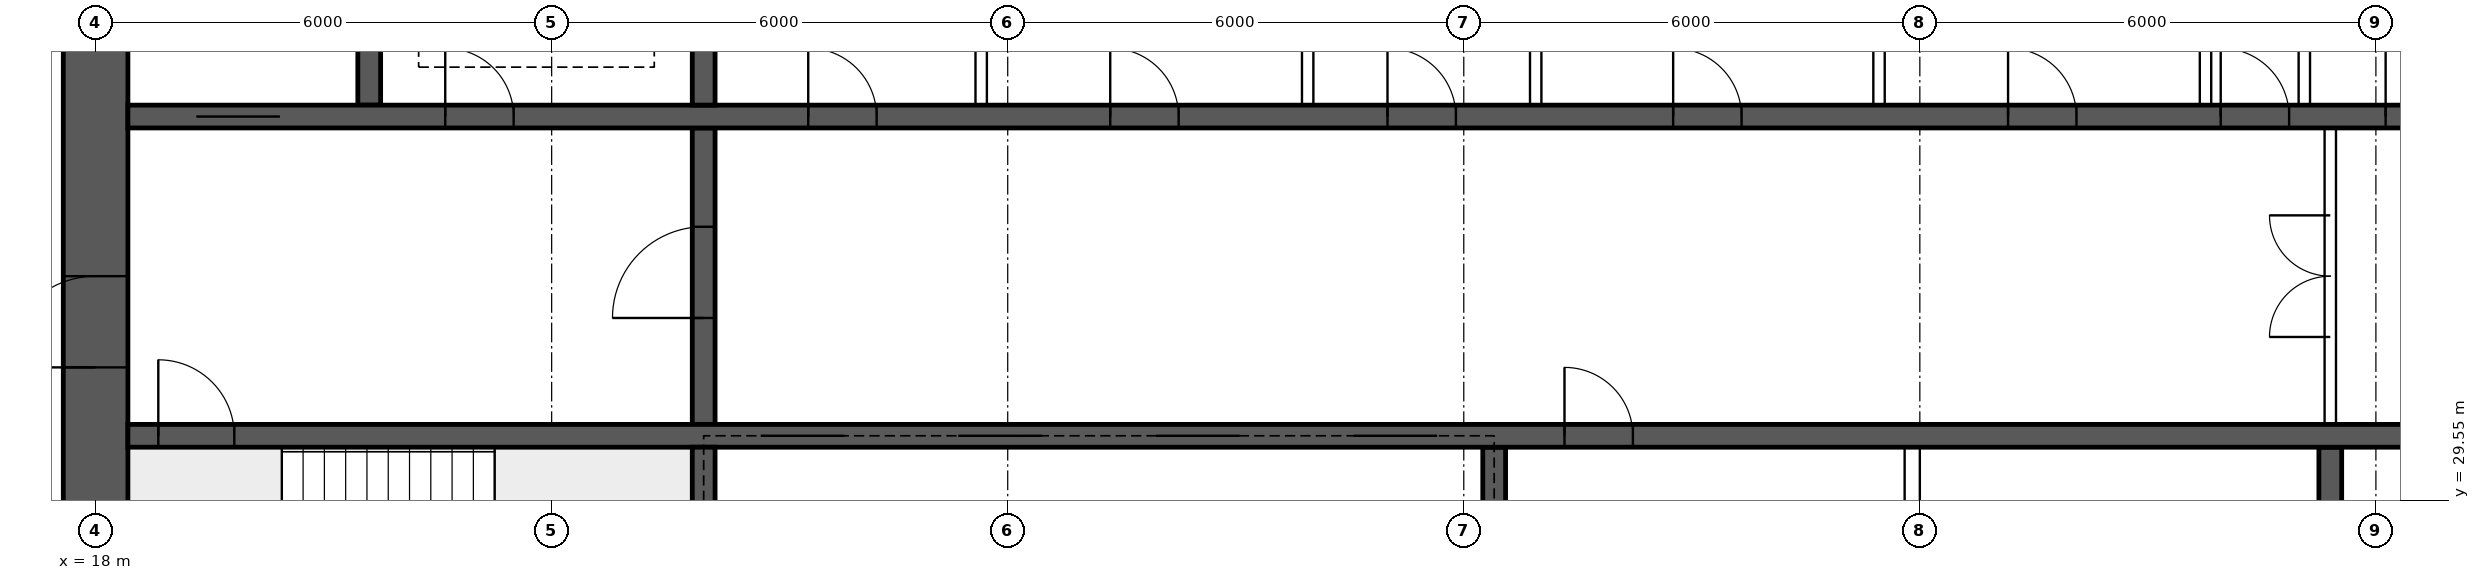
"""IFC4 building model, lengths in metres.
Left out: names, types, materials, properties, quantities, classifications, styles, units other than length and angle.
Written with IfcOpenShell. Run it as: python <this file> out.ifc"""

import sys

from ifc_helpers import new_model, si_unit, direction, frame, frame_2d, origin, place, context, subcontext, project, spatial, rectangle, extrude, element, fill, save


model = new_model("IFC4")
c1 = context("Model", 3, precision=1e-05, world=origin(), true_north=direction((0.0, 1.0)))
c2 = subcontext(c1, "Body", "Model", "MODEL_VIEW")
j1 = project(units=[si_unit("LENGTHUNIT", "METRE"), si_unit("PLANEANGLEUNIT", "RADIAN")], contexts=[c1])
p1 = place(None, origin())
s1 = spatial("IfcSite", under=j1, at=p1, CompositionType="ELEMENT")
p2 = place(p1, origin())
s2 = spatial("IfcBuilding", under=s1, at=p2, CompositionType="ELEMENT")
p3 = place(p2, frame((0.0, 0.0, 197.35)))
s3 = spatial("IfcBuildingStorey", under=s2, at=p3, CompositionType="ELEMENT", Elevation=197.35)
p4 = place(p3, frame((18.0, 26.225, 0.0), z_axis=(0.0, 0.0, 1.0), x_axis=(0.0, 1.0, 0.0)))
e1 = element("IfcWall", 1, at=p4, inside=s3, PredefinedType="SHEAR", context=c2, shape_type="SweptSolid", body=[
    extrude(rectangle(XDim=11.55, YDim=0.85, at=frame_2d((5.775, 0.0))), origin(), (0.0, 0.0, 1.0), 3.75),
])
p5 = place(p4, frame((5.075, 0.0, 0.0)))
e2 = element("IfcOpeningElement", 2, at=p5, cuts=e1, PredefinedType="OPENING", context=c2, shape_type="SweptSolid", body=[
    extrude(rectangle(XDim=1.2, YDim=2.1, at=frame_2d((0.6, 1.05))), frame((0.0, 0.435, 0.0), z_axis=(0.0, -1.0, 0.0), x_axis=(1.0, 0.0, 0.0)), (0.0, 0.0, 1.0), 0.87),
])
p6 = place(p3, frame((18.425, 30.4, 0.0), z_axis=(0.0, 0.0, 1.0), x_axis=(1.0, 0.0, 0.0)))
e3 = element("IfcWall", 3, at=p6, inside=s3, PredefinedType="SHEAR", context=c2, shape_type="SweptSolid", body=[
    extrude(rectangle(XDim=47.15, YDim=0.3, at=frame_2d((23.575, 0.0))), origin(), (0.0, 0.0, 1.0), 3.75),
])
p7 = place(p6, frame((0.4, 0.0, 0.0)))
e4 = element("IfcOpeningElement", 4, at=p7, cuts=e3, PredefinedType="OPENING", context=c2, shape_type="SweptSolid", body=[
    extrude(rectangle(XDim=1.0, YDim=2.1, at=frame_2d((0.5, 1.05))), frame((0.0, 0.16, 0.0), z_axis=(0.0, -1.0, 0.0), x_axis=(1.0, 0.0, 0.0)), (0.0, 0.0, 1.0), 0.32),
])
p8 = place(p6, frame((45.75, 0.0, 0.0)))
e5 = element("IfcOpeningElement", 5, at=p8, cuts=e3, PredefinedType="OPENING", context=c2, shape_type="SweptSolid", body=[
    extrude(rectangle(XDim=1.0, YDim=2.1, at=frame_2d((0.5, 1.05))), frame((0.0, 0.16, 0.0), z_axis=(0.0, -1.0, 0.0), x_axis=(1.0, 0.0, 0.0)), (0.0, 0.0, 1.0), 0.32),
])
p9 = place(p6, frame((8.325, 0.0, 0.0)))
e6 = element("IfcOpeningElement", 6, at=p9, cuts=e3, PredefinedType="OPENING", context=c2, shape_type="SweptSolid", body=[
    extrude(rectangle(XDim=1.1, YDim=2.1, at=frame_2d((0.55, 1.05))), frame((0.0, 0.16, 0.0), z_axis=(0.0, -1.0, 0.0), x_axis=(1.0, 0.0, 0.0)), (0.0, 0.0, 1.0), 0.32),
])
p10 = place(p6, frame((10.925, 0.0, 0.0)))
e7 = element("IfcOpeningElement", 7, at=p10, cuts=e3, PredefinedType="OPENING", context=c2, shape_type="SweptSolid", body=[
    extrude(rectangle(XDim=1.1, YDim=2.1, at=frame_2d((0.55, 1.05))), frame((0.0, 0.16, 0.0), z_axis=(0.0, -1.0, 0.0), x_axis=(1.0, 0.0, 0.0)), (0.0, 0.0, 1.0), 0.32),
])
p11 = place(p6, frame((13.525, 0.0, 0.0)))
e8 = element("IfcOpeningElement", 8, at=p11, cuts=e3, PredefinedType="OPENING", context=c2, shape_type="SweptSolid", body=[
    extrude(rectangle(XDim=1.1, YDim=2.1, at=frame_2d((0.55, 1.05))), frame((0.0, 0.16, 0.0), z_axis=(0.0, -1.0, 0.0), x_axis=(1.0, 0.0, 0.0)), (0.0, 0.0, 1.0), 0.32),
])
p12 = place(p6, frame((16.125, 0.0, 0.0)))
e9 = element("IfcOpeningElement", 9, at=p12, cuts=e3, PredefinedType="OPENING", context=c2, shape_type="SweptSolid", body=[
    extrude(rectangle(XDim=1.1, YDim=2.1, at=frame_2d((0.55, 1.05))), frame((0.0, 0.16, 0.0), z_axis=(0.0, -1.0, 0.0), x_axis=(1.0, 0.0, 0.0)), (0.0, 0.0, 1.0), 0.32),
])
p13 = place(p6, frame((18.9, 0.0, 0.0)))
e10 = element("IfcOpeningElement", 10, at=p13, cuts=e3, PredefinedType="OPENING", context=c2, shape_type="SweptSolid", body=[
    extrude(rectangle(XDim=0.9, YDim=2.1, at=frame_2d((0.45, 1.05))), frame((0.0, 0.16, 0.0), z_axis=(0.0, -1.0, 0.0), x_axis=(1.0, 0.0, 0.0)), (0.0, 0.0, 1.0), 0.32),
])
p14 = place(p6, frame((30.192, 0.0, 0.0)))
e11 = element("IfcOpeningElement", 11, at=p14, cuts=e3, PredefinedType="OPENING", context=c2, shape_type="SweptSolid", body=[
    extrude(rectangle(XDim=1.1, YDim=2.1, at=frame_2d((0.55, 1.05))), frame((0.0, 0.16, 0.0), z_axis=(0.0, -1.0, 0.0), x_axis=(1.0, 0.0, 0.0)), (0.0, 0.0, 1.0), 0.32),
])
p15 = place(p6, frame((33.725, 0.0, 0.0)))
e12 = element("IfcOpeningElement", 12, at=p15, cuts=e3, PredefinedType="OPENING", context=c2, shape_type="SweptSolid", body=[
    extrude(rectangle(XDim=1.1, YDim=2.1, at=frame_2d((0.55, 1.05))), frame((0.0, 0.16, 0.0), z_axis=(0.0, -1.0, 0.0), x_axis=(1.0, 0.0, 0.0)), (0.0, 0.0, 1.0), 0.32),
])
p16 = place(p6, frame((37.258, 0.0, 0.0)))
e13 = element("IfcOpeningElement", 13, at=p16, cuts=e3, PredefinedType="OPENING", context=c2, shape_type="SweptSolid", body=[
    extrude(rectangle(XDim=1.1, YDim=2.1, at=frame_2d((0.55, 1.05))), frame((0.0, 0.16, 0.0), z_axis=(0.0, -1.0, 0.0), x_axis=(1.0, 0.0, 0.0)), (0.0, 0.0, 1.0), 0.32),
])
p17 = place(p3, frame((18.425, 34.6, 0.0), z_axis=(0.0, 0.0, 1.0), x_axis=(1.0, 0.0, 0.0)))
e14 = element("IfcWall", 14, at=p17, inside=s3, PredefinedType="SHEAR", context=c2, shape_type="SweptSolid", body=[
    extrude(rectangle(XDim=47.15, YDim=0.3, at=frame_2d((23.575, 0.0))), origin(), (0.0, 0.0, 1.0), 3.75),
])
p18 = place(p17, frame((0.9, 0.0, 0.0)))
e15 = element("IfcOpeningElement", 15, at=p18, cuts=e14, PredefinedType="OPENING", context=c2, shape_type="SweptSolid", body=[
    extrude(rectangle(XDim=1.1, YDim=2.1, at=frame_2d((0.55, 1.05))), frame((0.0, 0.16, 0.0), z_axis=(0.0, -1.0, 0.0), x_axis=(1.0, 0.0, 0.0)), (0.0, 0.0, 1.0), 0.32),
])
p19 = place(p17, frame((45.15, 0.0, 0.0)))
e16 = element("IfcOpeningElement", 16, at=p19, cuts=e14, PredefinedType="OPENING", context=c2, shape_type="SweptSolid", body=[
    extrude(rectangle(XDim=1.1, YDim=2.1, at=frame_2d((0.55, 1.05))), frame((0.0, 0.16, 0.0), z_axis=(0.0, -1.0, 0.0), x_axis=(1.0, 0.0, 0.0)), (0.0, 0.0, 1.0), 0.32),
])
p20 = place(p17, frame((4.175, 0.0, 0.0)))
e17 = element("IfcOpeningElement", 17, at=p20, cuts=e14, PredefinedType="OPENING", context=c2, shape_type="SweptSolid", body=[
    extrude(rectangle(XDim=0.9, YDim=2.1, at=frame_2d((0.45, 1.05))), frame((0.0, 0.16, 0.0), z_axis=(0.0, -1.0, 0.0), x_axis=(1.0, 0.0, 0.0)), (0.0, 0.0, 1.0), 0.32),
])
p21 = place(p17, frame((42.075, 0.0, 0.0)))
e18 = element("IfcOpeningElement", 18, at=p21, cuts=e14, PredefinedType="OPENING", context=c2, shape_type="SweptSolid", body=[
    extrude(rectangle(XDim=0.9, YDim=2.1, at=frame_2d((0.45, 1.05))), frame((0.0, 0.16, 0.0), z_axis=(0.0, -1.0, 0.0), x_axis=(1.0, 0.0, 0.0)), (0.0, 0.0, 1.0), 0.32),
])
p22 = place(p17, frame((8.95, 0.0, 0.0)))
e19 = element("IfcOpeningElement", 19, at=p22, cuts=e14, PredefinedType="OPENING", context=c2, shape_type="SweptSolid", body=[
    extrude(rectangle(XDim=0.9, YDim=2.1, at=frame_2d((0.45, 1.05))), frame((0.0, 0.16, 0.0), z_axis=(0.0, -1.0, 0.0), x_axis=(1.0, 0.0, 0.0)), (0.0, 0.0, 1.0), 0.32),
])
p23 = place(p17, frame((12.924, 0.0, 0.0)))
e20 = element("IfcOpeningElement", 20, at=p23, cuts=e14, PredefinedType="OPENING", context=c2, shape_type="SweptSolid", body=[
    extrude(rectangle(XDim=0.9, YDim=2.1, at=frame_2d((0.45, 1.05))), frame((0.0, 0.16, 0.0), z_axis=(0.0, -1.0, 0.0), x_axis=(1.0, 0.0, 0.0)), (0.0, 0.0, 1.0), 0.32),
])
p24 = place(p17, frame((16.571, 0.0, 0.0)))
e21 = element("IfcOpeningElement", 21, at=p24, cuts=e14, PredefinedType="OPENING", context=c2, shape_type="SweptSolid", body=[
    extrude(rectangle(XDim=0.9, YDim=2.1, at=frame_2d((0.45, 1.05))), frame((0.0, 0.16, 0.0), z_axis=(0.0, -1.0, 0.0), x_axis=(1.0, 0.0, 0.0)), (0.0, 0.0, 1.0), 0.32),
])
p25 = place(p17, frame((20.33, 0.0, 0.0)))
e22 = element("IfcOpeningElement", 22, at=p25, cuts=e14, PredefinedType="OPENING", context=c2, shape_type="SweptSolid", body=[
    extrude(rectangle(XDim=0.9, YDim=2.1, at=frame_2d((0.45, 1.05))), frame((0.0, 0.16, 0.0), z_axis=(0.0, -1.0, 0.0), x_axis=(1.0, 0.0, 0.0)), (0.0, 0.0, 1.0), 0.32),
])
p26 = place(p17, frame((24.736, 0.0, 0.0)))
e23 = element("IfcOpeningElement", 23, at=p26, cuts=e14, PredefinedType="OPENING", context=c2, shape_type="SweptSolid", body=[
    extrude(rectangle(XDim=0.9, YDim=2.1, at=frame_2d((0.45, 1.05))), frame((0.0, 0.16, 0.0), z_axis=(0.0, -1.0, 0.0), x_axis=(1.0, 0.0, 0.0)), (0.0, 0.0, 1.0), 0.32),
])
p27 = place(p17, frame((27.533, 0.0, 0.0)))
e24 = element("IfcOpeningElement", 24, at=p27, cuts=e14, PredefinedType="OPENING", context=c2, shape_type="SweptSolid", body=[
    extrude(rectangle(XDim=0.9, YDim=2.1, at=frame_2d((0.45, 1.05))), frame((0.0, 0.16, 0.0), z_axis=(0.0, -1.0, 0.0), x_axis=(1.0, 0.0, 0.0)), (0.0, 0.0, 1.0), 0.32),
])
p28 = place(p17, frame((29.703, 0.0, 0.0)))
e25 = element("IfcOpeningElement", 25, at=p28, cuts=e14, PredefinedType="OPENING", context=c2, shape_type="SweptSolid", body=[
    extrude(rectangle(XDim=0.9, YDim=2.1, at=frame_2d((0.45, 1.05))), frame((0.0, 0.16, 0.0), z_axis=(0.0, -1.0, 0.0), x_axis=(1.0, 0.0, 0.0)), (0.0, 0.0, 1.0), 0.32),
])
p29 = place(p17, frame((33.502, 0.0, 0.0)))
e26 = element("IfcOpeningElement", 26, at=p29, cuts=e14, PredefinedType="OPENING", context=c2, shape_type="SweptSolid", body=[
    extrude(rectangle(XDim=0.9, YDim=2.1, at=frame_2d((0.45, 1.05))), frame((0.0, 0.16, 0.0), z_axis=(0.0, -1.0, 0.0), x_axis=(1.0, 0.0, 0.0)), (0.0, 0.0, 1.0), 0.32),
])
p30 = place(p17, frame((37.453, 0.0, 0.0)))
e27 = element("IfcOpeningElement", 27, at=p30, cuts=e14, PredefinedType="OPENING", context=c2, shape_type="SweptSolid", body=[
    extrude(rectangle(XDim=0.9, YDim=2.1, at=frame_2d((0.45, 1.05))), frame((0.0, 0.16, 0.0), z_axis=(0.0, -1.0, 0.0), x_axis=(1.0, 0.0, 0.0)), (0.0, 0.0, 1.0), 0.32),
])
p31 = place(p3, frame((26.0, 26.225, 0.0), z_axis=(0.0, 0.0, 1.0), x_axis=(0.0, 1.0, 0.0)))
e28 = element("IfcWall", 28, at=p31, inside=s3, PredefinedType="SHEAR", context=c2, shape_type="SweptSolid", body=[
    extrude(rectangle(XDim=4.025, YDim=0.3, at=frame_2d((2.012, 0.0))), origin(), (0.0, 0.0, 1.0), 3.75),
])
p32 = place(p3, frame((26.0, 30.55, 0.0), z_axis=(0.0, 0.0, 1.0), x_axis=(0.0, 1.0, 0.0)))
e29 = element("IfcWall", 29, at=p32, inside=s3, PredefinedType="SHEAR", context=c2, shape_type="SweptSolid", body=[
    extrude(rectangle(XDim=3.9, YDim=0.3, at=frame_2d((1.95, 0.0))), origin(), (0.0, 0.0, 1.0), 3.75),
])
p33 = place(p32, frame((1.4, 0.0, 0.0)))
e30 = element("IfcOpeningElement", 30, at=p33, cuts=e29, PredefinedType="OPENING", context=c2, shape_type="SweptSolid", body=[
    extrude(rectangle(XDim=1.2, YDim=2.1, at=frame_2d((0.6, 1.05))), frame((0.0, 0.16, 0.0), z_axis=(0.0, -1.0, 0.0), x_axis=(1.0, 0.0, 0.0)), (0.0, 0.0, 1.0), 0.32),
])
for number, where, z_axis, x_axis in (
    (31, (21.6, 34.75, 0.0), (0.0, 0.0, 1.0), (0.0, 1.0, 0.0)),
    (32, (26.0, 34.75, 0.0), (0.0, 0.0, 1.0), (0.0, 1.0, 0.0)),
):
    element("IfcWall", number, at=place(p3, frame(where, z_axis=z_axis, x_axis=x_axis)), inside=s3, PredefinedType="SHEAR", context=c2, shape_type="SweptSolid", body=[
        extrude(rectangle(XDim=3.025, YDim=0.3, at=frame_2d((1.512, 0.0))), origin(), (0.0, 0.0, 1.0), 3.75),
    ])
for number, where, z_axis, x_axis in (
    (33, (36.4, 26.225, 0.0), (0.0, 0.0, 1.0), (0.0, 1.0, 0.0)),
    (34, (47.4, 26.225, 0.0), (0.0, 0.0, 1.0), (0.0, 1.0, 0.0)),
):
    element("IfcWall", number, at=place(p3, frame(where, z_axis=z_axis, x_axis=x_axis)), inside=s3, PredefinedType="SHEAR", context=c2, shape_type="SweptSolid", body=[
        extrude(rectangle(XDim=4.025, YDim=0.3, at=frame_2d((2.012, 0.0))), origin(), (0.0, 0.0, 1.0), 3.75),
    ])
p34 = place(p3, frame((47.4, 30.55, 0.0), z_axis=(0.0, 0.0, 1.0), x_axis=(0.0, 1.0, 0.0)))
e35 = element("IfcWall", 35, at=p34, inside=s3, PredefinedType="SOLIDWALL", context=c2, shape_type="SweptSolid", body=[
    extrude(rectangle(XDim=3.9, YDim=0.15, at=frame_2d((1.95, 0.0))), origin(), (0.0, 0.0, 1.0), 3.4),
])
p35 = place(p34, frame((1.15, 0.0, 0.0)))
e36 = element("IfcOpeningElement", 36, at=p35, cuts=e35, PredefinedType="OPENING", context=c2, shape_type="SweptSolid", body=[
    extrude(rectangle(XDim=1.6, YDim=2.1, at=frame_2d((0.8, 1.05))), frame((0.0, 0.085, 0.0), z_axis=(0.0, -1.0, 0.0), x_axis=(1.0, 0.0, 0.0)), (0.0, 0.0, 1.0), 0.17),
])
for number, where, z_axis, x_axis in (
    (37, (29.651, 34.75, 0.0), (0.0, 0.0, 1.0), (0.0, 1.0, 0.0)),
    (38, (33.946, 34.75, 0.0), (0.0, 0.0, 1.0), (0.0, 1.0, 0.0)),
    (39, (36.946, 34.75, 0.0), (0.0, 0.0, 1.0), (0.0, 1.0, 0.0)),
    (40, (41.463, 34.75, 0.0), (0.0, 0.0, 1.0), (0.0, 1.0, 0.0)),
    (41, (45.758, 34.75, 0.0), (0.0, 0.0, 1.0), (0.0, 1.0, 0.0)),
    (42, (47.058, 34.75, 0.0), (0.0, 0.0, 1.0), (0.0, 1.0, 0.0)),
):
    element("IfcWall", number, at=place(p3, frame(where, z_axis=z_axis, x_axis=x_axis)), inside=s3, PredefinedType="SOLIDWALL", context=c2, shape_type="SweptSolid", body=[
        extrude(rectangle(XDim=3.025, YDim=0.15, at=frame_2d((1.512, 0.0))), origin(), (0.0, 0.0, 1.0), 3.4),
    ])
p36 = place(p3, frame((41.9, 26.225, 0.0), z_axis=(0.0, 0.0, 1.0), x_axis=(0.0, 1.0, 0.0)))
e43 = element("IfcWall", 43, at=p36, inside=s3, PredefinedType="SOLIDWALL", context=c2, shape_type="SweptSolid", body=[
    extrude(rectangle(XDim=4.025, YDim=0.2, at=frame_2d((2.012, 0.0))), origin(), (0.0, 0.0, 1.0), 3.4),
])
p37 = place(p35, origin())
e44 = element("IfcDoor", 44, at=p37, inside=s3, OperationType="DOUBLE_DOOR_SINGLE_SWING", PredefinedType="DOOR", context=c2, shape_type="SweptSolid", body=[
    extrude(rectangle(XDim=1.6, YDim=2.1, at=frame_2d((0.8, 1.05))), frame((0.0, 0.025, 0.0), z_axis=(0.0, -1.0, 0.0), x_axis=(1.0, 0.0, 0.0)), (0.0, 0.0, 1.0), 0.05),
])
fill(e36, e44)
p38 = place(p5, origin())
e45 = element("IfcDoor", 45, at=p38, inside=s3, OperationType="SINGLE_SWING_LEFT", PredefinedType="DOOR", context=c2, shape_type="SweptSolid", body=[
    extrude(rectangle(XDim=1.2, YDim=2.1, at=frame_2d((0.6, 1.05))), frame((0.0, 0.025, 0.0), z_axis=(0.0, -1.0, 0.0), x_axis=(1.0, 0.0, 0.0)), (0.0, 0.0, 1.0), 0.05),
])
fill(e2, e45)
p39 = place(p7, origin())
e46 = element("IfcDoor", 46, at=p39, inside=s3, OperationType="SINGLE_SWING_LEFT", PredefinedType="DOOR", context=c2, shape_type="SweptSolid", body=[
    extrude(rectangle(XDim=1.0, YDim=2.1, at=frame_2d((0.5, 1.05))), frame((0.0, 0.025, 0.0), z_axis=(0.0, -1.0, 0.0), x_axis=(1.0, 0.0, 0.0)), (0.0, 0.0, 1.0), 0.05),
])
fill(e4, e46)
p40 = place(p18, origin())
e47 = element("IfcDoor", 47, at=p40, inside=s3, OperationType="DOUBLE_DOOR_SLIDING", PredefinedType="DOOR", context=c2, shape_type="SweptSolid", body=[
    extrude(rectangle(XDim=1.1, YDim=2.1, at=frame_2d((0.55, 1.05))), frame((0.0, 0.025, 0.0), z_axis=(0.0, -1.0, 0.0), x_axis=(1.0, 0.0, 0.0)), (0.0, 0.0, 1.0), 0.05),
])
fill(e15, e47)
p41 = place(p20, origin())
e48 = element("IfcDoor", 48, at=p41, inside=s3, OperationType="SINGLE_SWING_LEFT", PredefinedType="DOOR", context=c2, shape_type="SweptSolid", body=[
    extrude(rectangle(XDim=0.9, YDim=2.1, at=frame_2d((0.45, 1.05))), frame((0.0, 0.025, 0.0), z_axis=(0.0, -1.0, 0.0), x_axis=(1.0, 0.0, 0.0)), (0.0, 0.0, 1.0), 0.05),
])
fill(e17, e48)
p42 = place(p33, origin())
e49 = element("IfcDoor", 49, at=p42, inside=s3, OperationType="SINGLE_SWING_LEFT", PredefinedType="DOOR", context=c2, shape_type="SweptSolid", body=[
    extrude(rectangle(XDim=1.2, YDim=2.1, at=frame_2d((0.6, 1.05))), frame((0.0, 0.025, 0.0), z_axis=(0.0, -1.0, 0.0), x_axis=(1.0, 0.0, 0.0)), (0.0, 0.0, 1.0), 0.05),
])
fill(e30, e49)
p43 = place(p22, origin())
e50 = element("IfcDoor", 50, at=p43, inside=s3, OperationType="SINGLE_SWING_LEFT", PredefinedType="DOOR", context=c2, shape_type="SweptSolid", body=[
    extrude(rectangle(XDim=0.9, YDim=2.1, at=frame_2d((0.45, 1.05))), frame((0.0, 0.025, 0.0), z_axis=(0.0, -1.0, 0.0), x_axis=(1.0, 0.0, 0.0)), (0.0, 0.0, 1.0), 0.05),
])
fill(e19, e50)
p44 = place(p23, origin())
e51 = element("IfcDoor", 51, at=p44, inside=s3, OperationType="SINGLE_SWING_LEFT", PredefinedType="DOOR", context=c2, shape_type="SweptSolid", body=[
    extrude(rectangle(XDim=0.9, YDim=2.1, at=frame_2d((0.45, 1.05))), frame((0.0, 0.025, 0.0), z_axis=(0.0, -1.0, 0.0), x_axis=(1.0, 0.0, 0.0)), (0.0, 0.0, 1.0), 0.05),
])
fill(e20, e51)
p45 = place(p24, origin())
e52 = element("IfcDoor", 52, at=p45, inside=s3, OperationType="SINGLE_SWING_LEFT", PredefinedType="DOOR", context=c2, shape_type="SweptSolid", body=[
    extrude(rectangle(XDim=0.9, YDim=2.1, at=frame_2d((0.45, 1.05))), frame((0.0, 0.025, 0.0), z_axis=(0.0, -1.0, 0.0), x_axis=(1.0, 0.0, 0.0)), (0.0, 0.0, 1.0), 0.05),
])
fill(e21, e52)
p46 = place(p25, origin())
e53 = element("IfcDoor", 53, at=p46, inside=s3, OperationType="SINGLE_SWING_LEFT", PredefinedType="DOOR", context=c2, shape_type="SweptSolid", body=[
    extrude(rectangle(XDim=0.9, YDim=2.1, at=frame_2d((0.45, 1.05))), frame((0.0, 0.025, 0.0), z_axis=(0.0, -1.0, 0.0), x_axis=(1.0, 0.0, 0.0)), (0.0, 0.0, 1.0), 0.05),
])
fill(e22, e53)
p47 = place(p26, origin())
e54 = element("IfcDoor", 54, at=p47, inside=s3, OperationType="SINGLE_SWING_LEFT", PredefinedType="DOOR", context=c2, shape_type="SweptSolid", body=[
    extrude(rectangle(XDim=0.9, YDim=2.1, at=frame_2d((0.45, 1.05))), frame((0.0, 0.025, 0.0), z_axis=(0.0, -1.0, 0.0), x_axis=(1.0, 0.0, 0.0)), (0.0, 0.0, 1.0), 0.05),
])
fill(e23, e54)
p48 = place(p27, origin())
e55 = element("IfcDoor", 55, at=p48, inside=s3, OperationType="SINGLE_SWING_LEFT", PredefinedType="DOOR", context=c2, shape_type="SweptSolid", body=[
    extrude(rectangle(XDim=0.9, YDim=2.1, at=frame_2d((0.45, 1.05))), frame((0.0, 0.025, 0.0), z_axis=(0.0, -1.0, 0.0), x_axis=(1.0, 0.0, 0.0)), (0.0, 0.0, 1.0), 0.05),
])
fill(e24, e55)
p49 = place(p28, origin())
e56 = element("IfcDoor", 56, at=p49, inside=s3, OperationType="SINGLE_SWING_LEFT", PredefinedType="DOOR", context=c2, shape_type="SweptSolid", body=[
    extrude(rectangle(XDim=0.9, YDim=2.1, at=frame_2d((0.45, 1.05))), frame((0.0, 0.025, 0.0), z_axis=(0.0, -1.0, 0.0), x_axis=(1.0, 0.0, 0.0)), (0.0, 0.0, 1.0), 0.05),
])
fill(e25, e56)
p50 = place(p9, origin())
e57 = element("IfcDoor", 57, at=p50, inside=s3, OperationType="DOUBLE_DOOR_SLIDING", PredefinedType="DOOR", context=c2, shape_type="SweptSolid", body=[
    extrude(rectangle(XDim=1.1, YDim=2.1, at=frame_2d((0.55, 1.05))), frame((0.0, 0.025, 0.0), z_axis=(0.0, -1.0, 0.0), x_axis=(1.0, 0.0, 0.0)), (0.0, 0.0, 1.0), 0.05),
])
fill(e6, e57)
p51 = place(p10, origin())
e58 = element("IfcDoor", 58, at=p51, inside=s3, OperationType="DOUBLE_DOOR_SLIDING", PredefinedType="DOOR", context=c2, shape_type="SweptSolid", body=[
    extrude(rectangle(XDim=1.1, YDim=2.1, at=frame_2d((0.55, 1.05))), frame((0.0, 0.025, 0.0), z_axis=(0.0, -1.0, 0.0), x_axis=(1.0, 0.0, 0.0)), (0.0, 0.0, 1.0), 0.05),
])
fill(e7, e58)
p52 = place(p11, origin())
e59 = element("IfcDoor", 59, at=p52, inside=s3, OperationType="DOUBLE_DOOR_SLIDING", PredefinedType="DOOR", context=c2, shape_type="SweptSolid", body=[
    extrude(rectangle(XDim=1.1, YDim=2.1, at=frame_2d((0.55, 1.05))), frame((0.0, 0.025, 0.0), z_axis=(0.0, -1.0, 0.0), x_axis=(1.0, 0.0, 0.0)), (0.0, 0.0, 1.0), 0.05),
])
fill(e8, e59)
p53 = place(p12, origin())
e60 = element("IfcDoor", 60, at=p53, inside=s3, OperationType="DOUBLE_DOOR_SLIDING", PredefinedType="DOOR", context=c2, shape_type="SweptSolid", body=[
    extrude(rectangle(XDim=1.1, YDim=2.1, at=frame_2d((0.55, 1.05))), frame((0.0, 0.025, 0.0), z_axis=(0.0, -1.0, 0.0), x_axis=(1.0, 0.0, 0.0)), (0.0, 0.0, 1.0), 0.05),
])
fill(e9, e60)
p54 = place(p13, origin())
e61 = element("IfcDoor", 61, at=p54, inside=s3, OperationType="SINGLE_SWING_LEFT", PredefinedType="DOOR", context=c2, shape_type="SweptSolid", body=[
    extrude(rectangle(XDim=0.9, YDim=2.1, at=frame_2d((0.45, 1.05))), frame((0.0, 0.025, 0.0), z_axis=(0.0, -1.0, 0.0), x_axis=(1.0, 0.0, 0.0)), (0.0, 0.0, 1.0), 0.05),
])
fill(e10, e61)
save(model, sys.argv[1])
